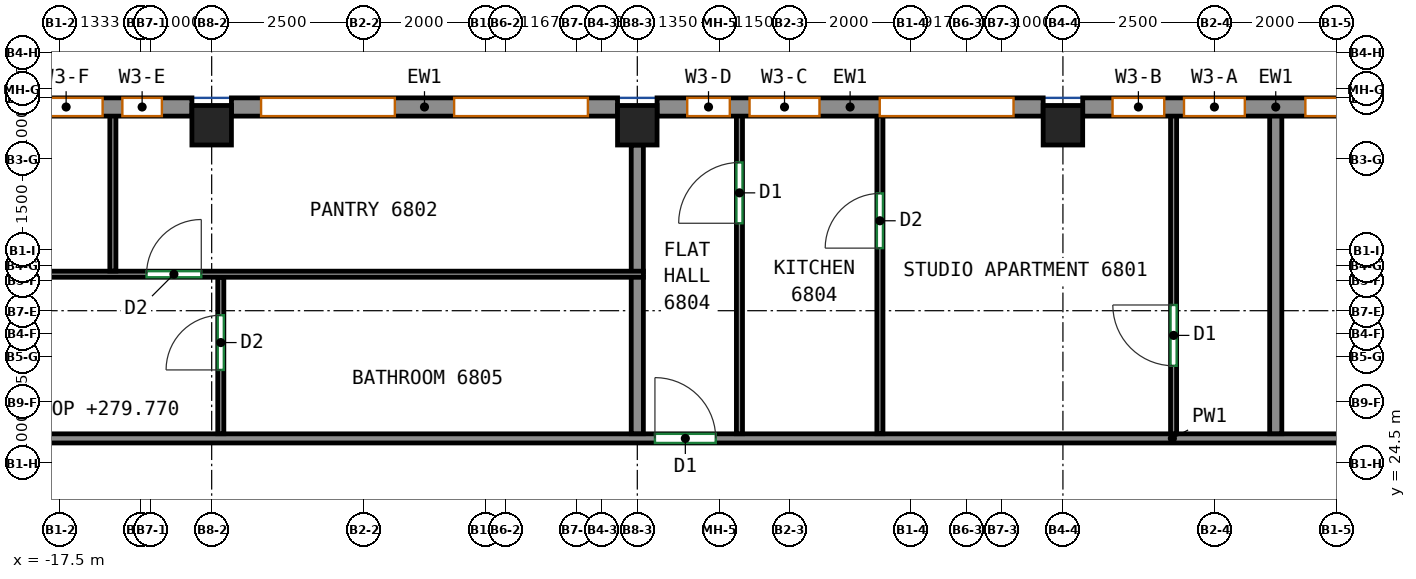
"""IFC4 building model, lengths in metres.
Left out: names, types, materials, properties, quantities, classifications, styles, units other than length and angle.
Written with IfcOpenShell. Run it as: python <this file> out.ifc"""

import sys

from ifc_helpers import new_model, si_unit, direction, frame, frame_2d, origin, origin_2d, place, context, subcontext, project, spatial, rectangle, extrude, source, transform, mapped, element, fill, save


model = new_model("IFC4")
c1 = context("Model", 3, precision=1e-05, world=origin(), true_north=direction((0.0, 1.0)))
c2 = subcontext(c1, "Body", "Model", "MODEL_VIEW")
j1 = project(units=[si_unit("LENGTHUNIT", "METRE"), si_unit("PLANEANGLEUNIT", "RADIAN")], contexts=[c1])
p1 = place(None, origin())
s1 = spatial("IfcSite", under=j1, at=p1, CompositionType="ELEMENT")
p2 = place(p1, origin())
s2 = spatial("IfcBuilding", under=s1, at=p2, CompositionType="ELEMENT")
p3 = place(p2, frame((0.0, 0.0, 277.2)))
s3 = spatial("IfcBuildingStorey", under=s2, at=p3, CompositionType="ELEMENT", Elevation=277.2)
m1 = source(origin(), c2, "Body", "SweptSolid", [
    extrude(rectangle(XDim=0.65, YDim=0.65, at=origin_2d()), origin(), (0.0, 0.0, 1.0), 3.12),
])
for number, where, z_axis, x_axis in (
    (1, (-15.0, 30.05, 0.0), (0.0, 0.0, 1.0), (1.0, 0.0, 0.0)),
    (2, (-8.0, 30.05, 0.0), (0.0, 0.0, 1.0), (1.0, 0.0, 0.0)),
    (3, (-1.0, 30.05, 0.0), (0.0, 0.0, 1.0), (1.0, 0.0, 0.0)),
):
    element("IfcColumn", number, at=place(p3, frame(where, z_axis=z_axis, x_axis=x_axis)), inside=s3, PredefinedType="COLUMN", context=c2, shape_type="MappedRepresentation", body=[
        mapped(m1, transform((0.0, 0.0, 0.0))),
    ])
m2 = source(origin(), c2, "Body", "SweptSolid", [
    extrude(rectangle(XDim=6.35, YDim=0.3, at=frame_2d((3.175, 0.0))), origin(), (0.0, 0.0, 1.0), 3.12),
])
p4 = place(p3, frame((5.675, 30.35, 0.0), z_axis=(0.0, 0.0, 1.0), x_axis=(-1.0, 0.0, 0.0)))
e4 = element("IfcWall", 4, at=p4, inside=s3, PredefinedType="SOLIDWALL", context=c2, shape_type="MappedRepresentation", body=[
    mapped(m2, transform((0.0, 0.0, 0.0))),
])
p5 = place(p4, frame((0.488, 0.0, 0.8)))
e5 = element("IfcOpeningElement", 5, at=p5, cuts=e4, PredefinedType="OPENING", context=c2, shape_type="SweptSolid", body=[
    extrude(rectangle(XDim=2.2, YDim=2.05, at=frame_2d((1.1, 1.025))), frame((0.0, 0.16, 0.0), z_axis=(0.0, -1.0, 0.0), x_axis=(1.0, 0.0, 0.0)), (0.0, 0.0, 1.0), 0.32),
])
p6 = place(p4, frame((3.684, 0.0, 0.8)))
e6 = element("IfcOpeningElement", 6, at=p6, cuts=e4, PredefinedType="OPENING", context=c2, shape_type="SweptSolid", body=[
    extrude(rectangle(XDim=1.0, YDim=2.05, at=frame_2d((0.5, 1.025))), frame((0.0, 0.16, 0.0), z_axis=(0.0, -1.0, 0.0), x_axis=(1.0, 0.0, 0.0)), (0.0, 0.0, 1.0), 0.32),
])
p7 = place(p4, frame((5.009, 0.0, 0.8)))
e7 = element("IfcOpeningElement", 7, at=p7, cuts=e4, PredefinedType="OPENING", context=c2, shape_type="SweptSolid", body=[
    extrude(rectangle(XDim=0.85, YDim=2.05, at=frame_2d((0.425, 1.025))), frame((0.0, 0.16, 0.0), z_axis=(0.0, -1.0, 0.0), x_axis=(1.0, 0.0, 0.0)), (0.0, 0.0, 1.0), 0.32),
])
p8 = place(p3, frame((-1.325, 30.35, 0.0), z_axis=(0.0, 0.0, 1.0), x_axis=(-1.0, 0.0, 0.0)))
e8 = element("IfcWall", 8, at=p8, inside=s3, PredefinedType="SOLIDWALL", context=c2, shape_type="MappedRepresentation", body=[
    mapped(m2, transform((0.0, 0.0, 0.0))),
])
p9 = place(p8, frame((0.488, 0.0, 0.8)))
e9 = element("IfcOpeningElement", 9, at=p9, cuts=e8, PredefinedType="OPENING", context=c2, shape_type="SweptSolid", body=[
    extrude(rectangle(XDim=2.2, YDim=2.05, at=frame_2d((1.1, 1.025))), frame((0.0, 0.16, 0.0), z_axis=(0.0, -1.0, 0.0), x_axis=(1.0, 0.0, 0.0)), (0.0, 0.0, 1.0), 0.32),
])
p10 = place(p8, frame((3.679, 0.0, 0.8)))
e10 = element("IfcOpeningElement", 10, at=p10, cuts=e8, PredefinedType="OPENING", context=c2, shape_type="SweptSolid", body=[
    extrude(rectangle(XDim=1.15, YDim=2.05, at=frame_2d((0.575, 1.025))), frame((0.0, 0.16, 0.0), z_axis=(0.0, -1.0, 0.0), x_axis=(1.0, 0.0, 0.0)), (0.0, 0.0, 1.0), 0.32),
])
p11 = place(p8, frame((5.154, 0.0, 0.8)))
e11 = element("IfcOpeningElement", 11, at=p11, cuts=e8, PredefinedType="OPENING", context=c2, shape_type="SweptSolid", body=[
    extrude(rectangle(XDim=0.7, YDim=2.05, at=frame_2d((0.35, 1.025))), frame((0.0, 0.16, 0.0), z_axis=(0.0, -1.0, 0.0), x_axis=(1.0, 0.0, 0.0)), (0.0, 0.0, 1.0), 0.32),
])
p12 = place(p3, frame((-8.325, 30.35, 0.0), z_axis=(0.0, 0.0, 1.0), x_axis=(-1.0, 0.0, 0.0)))
e12 = element("IfcWall", 12, at=p12, inside=s3, PredefinedType="SOLIDWALL", context=c2, shape_type="MappedRepresentation", body=[
    mapped(m2, transform((0.0, 0.0, 0.0))),
])
p13 = place(p12, frame((0.488, 0.0, 0.8)))
e13 = element("IfcOpeningElement", 13, at=p13, cuts=e12, PredefinedType="OPENING", context=c2, shape_type="SweptSolid", body=[
    extrude(rectangle(XDim=2.2, YDim=2.05, at=frame_2d((1.1, 1.025))), frame((0.0, 0.16, 0.0), z_axis=(0.0, -1.0, 0.0), x_axis=(1.0, 0.0, 0.0)), (0.0, 0.0, 1.0), 0.32),
])
p14 = place(p12, frame((3.663, 0.0, 0.8)))
e14 = element("IfcOpeningElement", 14, at=p14, cuts=e12, PredefinedType="OPENING", context=c2, shape_type="SweptSolid", body=[
    extrude(rectangle(XDim=2.2, YDim=2.05, at=frame_2d((1.1, 1.025))), frame((0.0, 0.16, 0.0), z_axis=(0.0, -1.0, 0.0), x_axis=(1.0, 0.0, 0.0)), (0.0, 0.0, 1.0), 0.32),
])
p15 = place(p3, frame((-15.325, 30.35, 0.0), z_axis=(0.0, 0.0, 1.0), x_axis=(-1.0, 0.0, 0.0)))
e15 = element("IfcWall", 15, at=p15, inside=s3, PredefinedType="SOLIDWALL", context=c2, shape_type="MappedRepresentation", body=[
    mapped(m2, transform((0.0, 0.0, 0.0))),
])
p16 = place(p15, frame((0.494, 0.0, 0.8)))
e16 = element("IfcOpeningElement", 16, at=p16, cuts=e15, PredefinedType="OPENING", context=c2, shape_type="SweptSolid", body=[
    extrude(rectangle(XDim=0.65, YDim=2.05, at=frame_2d((0.325, 1.025))), frame((0.0, 0.16, 0.0), z_axis=(0.0, -1.0, 0.0), x_axis=(1.0, 0.0, 0.0)), (0.0, 0.0, 1.0), 0.32),
])
p17 = place(p15, frame((3.663, 0.0, 0.8)))
e17 = element("IfcOpeningElement", 17, at=p17, cuts=e15, PredefinedType="OPENING", context=c2, shape_type="SweptSolid", body=[
    extrude(rectangle(XDim=2.2, YDim=2.05, at=frame_2d((1.1, 1.025))), frame((0.0, 0.16, 0.0), z_axis=(0.0, -1.0, 0.0), x_axis=(1.0, 0.0, 0.0)), (0.0, 0.0, 1.0), 0.32),
])
p18 = place(p15, frame((1.469, 0.0, 0.8)))
e18 = element("IfcOpeningElement", 18, at=p18, cuts=e15, PredefinedType="OPENING", context=c2, shape_type="SweptSolid", body=[
    extrude(rectangle(XDim=1.2, YDim=2.05, at=frame_2d((0.6, 1.025))), frame((0.0, 0.16, 0.0), z_axis=(0.0, -1.0, 0.0), x_axis=(1.0, 0.0, 0.0)), (0.0, 0.0, 1.0), 0.32),
])
p19 = place(p3, frame((-19.075, 24.9, 0.0), z_axis=(0.0, 0.0, 1.0), x_axis=(1.0, 0.0, 0.0)))
e19 = element("IfcWall", 19, at=p19, inside=s3, PredefinedType="PARTITIONING", context=c2, shape_type="SweptSolid", body=[
    extrude(rectangle(XDim=39.75, YDim=0.15, at=frame_2d((19.875, 0.0))), origin(), (0.0, 0.0, 1.0), 3.12),
])
p20 = place(p19, frame((11.365, 0.0, 0.0)))
e20 = element("IfcOpeningElement", 20, at=p20, cuts=e19, PredefinedType="OPENING", context=c2, shape_type="SweptSolid", body=[
    extrude(rectangle(XDim=1.0, YDim=2.1, at=frame_2d((0.5, 1.05))), frame((0.0, 0.085, 0.0), z_axis=(0.0, -1.0, 0.0), x_axis=(1.0, 0.0, 0.0)), (0.0, 0.0, 1.0), 0.17),
])
p21 = place(p19, frame((33.379, 0.0, 0.0)))
e21 = element("IfcOpeningElement", 21, at=p21, cuts=e19, PredefinedType="OPENING", context=c2, shape_type="SweptSolid", body=[
    extrude(rectangle(XDim=0.9, YDim=2.1, at=frame_2d((0.45, 1.05))), frame((0.0, 0.085, 0.0), z_axis=(0.0, -1.0, 0.0), x_axis=(1.0, 0.0, 0.0)), (0.0, 0.0, 1.0), 0.17),
])
p22 = place(p3, frame((2.5, 30.25, 0.0), z_axis=(0.0, 0.0, 1.0), x_axis=(0.0, -1.0, 0.0)))
e22 = element("IfcWall", 22, at=p22, inside=s3, PredefinedType="PARTITIONING", context=c2, shape_type="SweptSolid", body=[
    extrude(rectangle(XDim=5.273, YDim=0.2, at=frame_2d((2.636, 0.0))), origin(), (0.0, 0.0, 1.0), 3.12),
])
p23 = place(p3, frame((-6.32, 24.977, 0.0), z_axis=(0.0, 0.0, 1.0), x_axis=(0.0, 1.0, 0.0)))
e23 = element("IfcWall", 23, at=p23, inside=s3, PredefinedType="PARTITIONING", context=c2, shape_type="SweptSolid", body=[
    extrude(rectangle(XDim=5.273, YDim=0.1, at=frame_2d((2.636, 0.0))), origin(), (0.0, 0.0, 1.0), 3.12),
])
p24 = place(p23, frame((3.461, 0.0, 0.0)))
e24 = element("IfcOpeningElement", 24, at=p24, cuts=e23, PredefinedType="OPENING", context=c2, shape_type="SweptSolid", body=[
    extrude(rectangle(XDim=1.0, YDim=2.1, at=frame_2d((0.5, 1.05))), frame((0.0, 0.06, 0.0), z_axis=(0.0, -1.0, 0.0), x_axis=(1.0, 0.0, 0.0)), (0.0, 0.0, 1.0), 0.12),
])
p25 = place(p3, frame((-8.0, 24.977, 0.0), z_axis=(0.0, 0.0, 1.0), x_axis=(0.0, 1.0, 0.0)))
e25 = element("IfcWall", 25, at=p25, inside=s3, PredefinedType="PARTITIONING", context=c2, shape_type="SweptSolid", body=[
    extrude(rectangle(XDim=2.583, YDim=0.2, at=frame_2d((1.292, 0.0))), origin(), (0.0, 0.0, 1.0), 3.12),
])
p26 = place(p3, frame((-8.0, 27.642, 0.0), z_axis=(0.0, 0.0, 1.0), x_axis=(0.0, 1.0, 0.0)))
e26 = element("IfcWall", 26, at=p26, inside=s3, PredefinedType="PARTITIONING", context=c2, shape_type="SweptSolid", body=[
    extrude(rectangle(XDim=2.083, YDim=0.2, at=frame_2d((1.042, 0.0))), origin(), (0.0, 0.0, 1.0), 3.12),
])
p27 = place(p3, frame((-4.01, 24.977, 0.0), z_axis=(0.0, 0.0, 1.0), x_axis=(0.0, 1.0, 0.0)))
e27 = element("IfcWall", 27, at=p27, inside=s3, PredefinedType="PARTITIONING", context=c2, shape_type="SweptSolid", body=[
    extrude(rectangle(XDim=5.273, YDim=0.1, at=frame_2d((2.636, 0.0))), origin(), (0.0, 0.0, 1.0), 3.12),
])
p28 = place(p27, frame((3.052, 0.0, 0.0)))
e28 = element("IfcOpeningElement", 28, at=p28, cuts=e27, PredefinedType="OPENING", context=c2, shape_type="SweptSolid", body=[
    extrude(rectangle(XDim=0.9, YDim=2.1, at=frame_2d((0.45, 1.05))), frame((0.0, 0.06, 0.0), z_axis=(0.0, -1.0, 0.0), x_axis=(1.0, 0.0, 0.0)), (0.0, 0.0, 1.0), 0.12),
])
p29 = place(p3, frame((0.82, 24.977, 0.0), z_axis=(0.0, 0.0, 1.0), x_axis=(0.0, 1.0, 0.0)))
e29 = element("IfcWall", 29, at=p29, inside=s3, PredefinedType="PARTITIONING", context=c2, shape_type="SweptSolid", body=[
    extrude(rectangle(XDim=5.273, YDim=0.1, at=frame_2d((2.636, 0.0))), origin(), (0.0, 0.0, 1.0), 3.12),
])
p30 = place(p29, frame((1.117, 0.0, 0.0)))
e30 = element("IfcOpeningElement", 30, at=p30, cuts=e29, PredefinedType="OPENING", context=c2, shape_type="SweptSolid", body=[
    extrude(rectangle(XDim=1.0, YDim=2.1, at=frame_2d((0.5, 1.05))), frame((0.0, 0.06, 0.0), z_axis=(0.0, -1.0, 0.0), x_axis=(1.0, 0.0, 0.0)), (0.0, 0.0, 1.0), 0.12),
])
p31 = place(p3, frame((-14.85, 24.977, 0.0), z_axis=(0.0, 0.0, 1.0), x_axis=(0.0, 1.0, 0.0)))
e31 = element("IfcWall", 31, at=p31, inside=s3, PredefinedType="PARTITIONING", context=c2, shape_type="SweptSolid", body=[
    extrude(rectangle(XDim=2.573, YDim=0.1, at=frame_2d((1.287, 0.0))), origin(), (0.0, 0.0, 1.0), 3.12),
])
p32 = place(p31, frame((1.049, 0.0, 0.0)))
e32 = element("IfcOpeningElement", 32, at=p32, cuts=e31, PredefinedType="OPENING", context=c2, shape_type="SweptSolid", body=[
    extrude(rectangle(XDim=0.9, YDim=2.1, at=frame_2d((0.45, 1.05))), frame((0.0, 0.06, 0.0), z_axis=(0.0, -1.0, 0.0), x_axis=(1.0, 0.0, 0.0)), (0.0, 0.0, 1.0), 0.12),
])
p33 = place(p3, frame((-21.75, 27.6, 0.0), z_axis=(0.0, 0.0, 1.0), x_axis=(1.0, 0.0, 0.0)))
e33 = element("IfcWall", 33, at=p33, inside=s3, PredefinedType="PARTITIONING", context=c2, shape_type="SweptSolid", body=[
    extrude(rectangle(XDim=13.85, YDim=0.1, at=frame_2d((6.925, 0.0))), origin(), (0.0, 0.0, 1.0), 3.12),
])
p34 = place(p33, frame((5.679, 0.0, 0.0)))
e34 = element("IfcOpeningElement", 34, at=p34, cuts=e33, PredefinedType="OPENING", context=c2, shape_type="SweptSolid", body=[
    extrude(rectangle(XDim=0.9, YDim=2.1, at=frame_2d((0.45, 1.05))), frame((0.0, 0.06, 0.0), z_axis=(0.0, -1.0, 0.0), x_axis=(1.0, 0.0, 0.0)), (0.0, 0.0, 1.0), 0.12),
])
p35 = place(p3, frame((-16.625, 27.652, 0.0), z_axis=(0.0, 0.0, 1.0), x_axis=(0.0, 1.0, 0.0)))
e35 = element("IfcWall", 35, at=p35, inside=s3, PredefinedType="PARTITIONING", context=c2, shape_type="SweptSolid", body=[
    extrude(rectangle(XDim=2.598, YDim=0.1, at=frame_2d((1.299, 0.0))), origin(), (0.0, 0.0, 1.0), 3.12),
])
p36 = place(p5, origin())
e36 = element("IfcWindow", 36, at=p36, inside=s3, PartitioningType="SINGLE_PANEL", PredefinedType="WINDOW", context=c2, shape_type="SweptSolid", body=[
    extrude(rectangle(XDim=2.2, YDim=2.05, at=frame_2d((1.1, 1.025))), frame((0.0, 0.03, 0.0), z_axis=(0.0, -1.0, 0.0), x_axis=(1.0, 0.0, 0.0)), (0.0, 0.0, 1.0), 0.06),
])
fill(e5, e36)
p37 = place(p6, origin())
e37 = element("IfcWindow", 37, at=p37, inside=s3, PartitioningType="SINGLE_PANEL", PredefinedType="WINDOW", context=c2, shape_type="SweptSolid", body=[
    extrude(rectangle(XDim=1.0, YDim=2.05, at=frame_2d((0.5, 1.025))), frame((0.0, 0.03, 0.0), z_axis=(0.0, -1.0, 0.0), x_axis=(1.0, 0.0, 0.0)), (0.0, 0.0, 1.0), 0.06),
])
fill(e6, e37)
p38 = place(p9, origin())
e38 = element("IfcWindow", 38, at=p38, inside=s3, PartitioningType="SINGLE_PANEL", PredefinedType="WINDOW", context=c2, shape_type="SweptSolid", body=[
    extrude(rectangle(XDim=2.2, YDim=2.05, at=frame_2d((1.1, 1.025))), frame((0.0, 0.03, 0.0), z_axis=(0.0, -1.0, 0.0), x_axis=(1.0, 0.0, 0.0)), (0.0, 0.0, 1.0), 0.06),
])
fill(e9, e38)
p39 = place(p10, origin())
e39 = element("IfcWindow", 39, at=p39, inside=s3, PartitioningType="SINGLE_PANEL", PredefinedType="WINDOW", context=c2, shape_type="SweptSolid", body=[
    extrude(rectangle(XDim=1.15, YDim=2.05, at=frame_2d((0.575, 1.025))), frame((0.0, 0.03, 0.0), z_axis=(0.0, -1.0, 0.0), x_axis=(1.0, 0.0, 0.0)), (0.0, 0.0, 1.0), 0.06),
])
fill(e10, e39)
p40 = place(p13, origin())
e40 = element("IfcWindow", 40, at=p40, inside=s3, PartitioningType="SINGLE_PANEL", PredefinedType="WINDOW", context=c2, shape_type="SweptSolid", body=[
    extrude(rectangle(XDim=2.2, YDim=2.05, at=frame_2d((1.1, 1.025))), frame((0.0, 0.03, 0.0), z_axis=(0.0, -1.0, 0.0), x_axis=(1.0, 0.0, 0.0)), (0.0, 0.0, 1.0), 0.06),
])
fill(e13, e40)
p41 = place(p14, origin())
e41 = element("IfcWindow", 41, at=p41, inside=s3, PartitioningType="SINGLE_PANEL", PredefinedType="WINDOW", context=c2, shape_type="SweptSolid", body=[
    extrude(rectangle(XDim=2.2, YDim=2.05, at=frame_2d((1.1, 1.025))), frame((0.0, 0.03, 0.0), z_axis=(0.0, -1.0, 0.0), x_axis=(1.0, 0.0, 0.0)), (0.0, 0.0, 1.0), 0.06),
])
fill(e14, e41)
p42 = place(p16, origin())
e42 = element("IfcWindow", 42, at=p42, inside=s3, PartitioningType="SINGLE_PANEL", PredefinedType="WINDOW", context=c2, shape_type="SweptSolid", body=[
    extrude(rectangle(XDim=0.65, YDim=2.05, at=frame_2d((0.325, 1.025))), frame((0.0, 0.03, 0.0), z_axis=(0.0, -1.0, 0.0), x_axis=(1.0, 0.0, 0.0)), (0.0, 0.0, 1.0), 0.06),
])
fill(e16, e42)
p43 = place(p20, origin())
e43 = element("IfcDoor", 43, at=p43, inside=s3, OperationType="SINGLE_SWING_LEFT", PredefinedType="DOOR", context=c2, shape_type="SweptSolid", body=[
    extrude(rectangle(XDim=1.0, YDim=2.1, at=frame_2d((0.5, 1.05))), frame((0.0, 0.025, 0.0), z_axis=(0.0, -1.0, 0.0), x_axis=(1.0, 0.0, 0.0)), (0.0, 0.0, 1.0), 0.05),
])
fill(e20, e43)
p44 = place(p32, origin())
e44 = element("IfcDoor", 44, at=p44, inside=s3, OperationType="SINGLE_SWING_LEFT", PredefinedType="DOOR", context=c2, shape_type="SweptSolid", body=[
    extrude(rectangle(XDim=0.9, YDim=2.1, at=frame_2d((0.45, 1.05))), frame((0.0, 0.025, 0.0), z_axis=(0.0, -1.0, 0.0), x_axis=(1.0, 0.0, 0.0)), (0.0, 0.0, 1.0), 0.05),
])
fill(e32, e44)
p45 = place(p30, origin())
e45 = element("IfcDoor", 45, at=p45, inside=s3, OperationType="SINGLE_SWING_RIGHT", PredefinedType="DOOR", context=c2, shape_type="SweptSolid", body=[
    extrude(rectangle(XDim=1.0, YDim=2.1, at=frame_2d((0.5, 1.05))), frame((0.0, 0.025, 0.0), z_axis=(0.0, -1.0, 0.0), x_axis=(1.0, 0.0, 0.0)), (0.0, 0.0, 1.0), 0.05),
])
fill(e30, e45)
p46 = place(p34, origin())
e46 = element("IfcDoor", 46, at=p46, inside=s3, OperationType="SINGLE_SWING_RIGHT", PredefinedType="DOOR", context=c2, shape_type="SweptSolid", body=[
    extrude(rectangle(XDim=0.9, YDim=2.1, at=frame_2d((0.45, 1.05))), frame((0.0, 0.025, 0.0), z_axis=(0.0, -1.0, 0.0), x_axis=(1.0, 0.0, 0.0)), (0.0, 0.0, 1.0), 0.05),
])
fill(e34, e46)
p47 = place(p28, origin())
e47 = element("IfcDoor", 47, at=p47, inside=s3, OperationType="SINGLE_SWING_LEFT", PredefinedType="DOOR", context=c2, shape_type="SweptSolid", body=[
    extrude(rectangle(XDim=0.9, YDim=2.1, at=frame_2d((0.45, 1.05))), frame((0.0, 0.025, 0.0), z_axis=(0.0, -1.0, 0.0), x_axis=(1.0, 0.0, 0.0)), (0.0, 0.0, 1.0), 0.05),
])
fill(e28, e47)
p48 = place(p24, origin())
e48 = element("IfcDoor", 48, at=p48, inside=s3, OperationType="SINGLE_SWING_LEFT", PredefinedType="DOOR", context=c2, shape_type="SweptSolid", body=[
    extrude(rectangle(XDim=1.0, YDim=2.1, at=frame_2d((0.5, 1.05))), frame((0.0, 0.025, 0.0), z_axis=(0.0, -1.0, 0.0), x_axis=(1.0, 0.0, 0.0)), (0.0, 0.0, 1.0), 0.05),
])
fill(e24, e48)
p49 = place(p7, origin())
e49 = element("IfcWindow", 49, at=p49, inside=s3, PartitioningType="SINGLE_PANEL", PredefinedType="WINDOW", context=c2, shape_type="SweptSolid", body=[
    extrude(rectangle(XDim=0.85, YDim=2.05, at=frame_2d((0.425, 1.025))), frame((0.0, 0.03, 0.0), z_axis=(0.0, -1.0, 0.0), x_axis=(1.0, 0.0, 0.0)), (0.0, 0.0, 1.0), 0.06),
])
fill(e7, e49)
p50 = place(p11, origin())
e50 = element("IfcWindow", 50, at=p50, inside=s3, PartitioningType="SINGLE_PANEL", PredefinedType="WINDOW", context=c2, shape_type="SweptSolid", body=[
    extrude(rectangle(XDim=0.7, YDim=2.05, at=frame_2d((0.35, 1.025))), frame((0.0, 0.03, 0.0), z_axis=(0.0, -1.0, 0.0), x_axis=(1.0, 0.0, 0.0)), (0.0, 0.0, 1.0), 0.06),
])
fill(e11, e50)
p51 = place(p18, origin())
e51 = element("IfcWindow", 51, at=p51, inside=s3, PartitioningType="SINGLE_PANEL", PredefinedType="WINDOW", context=c2, shape_type="SweptSolid", body=[
    extrude(rectangle(XDim=1.2, YDim=2.05, at=frame_2d((0.6, 1.025))), frame((0.0, 0.03, 0.0), z_axis=(0.0, -1.0, 0.0), x_axis=(1.0, 0.0, 0.0)), (0.0, 0.0, 1.0), 0.06),
])
fill(e18, e51)
save(model, sys.argv[1])
